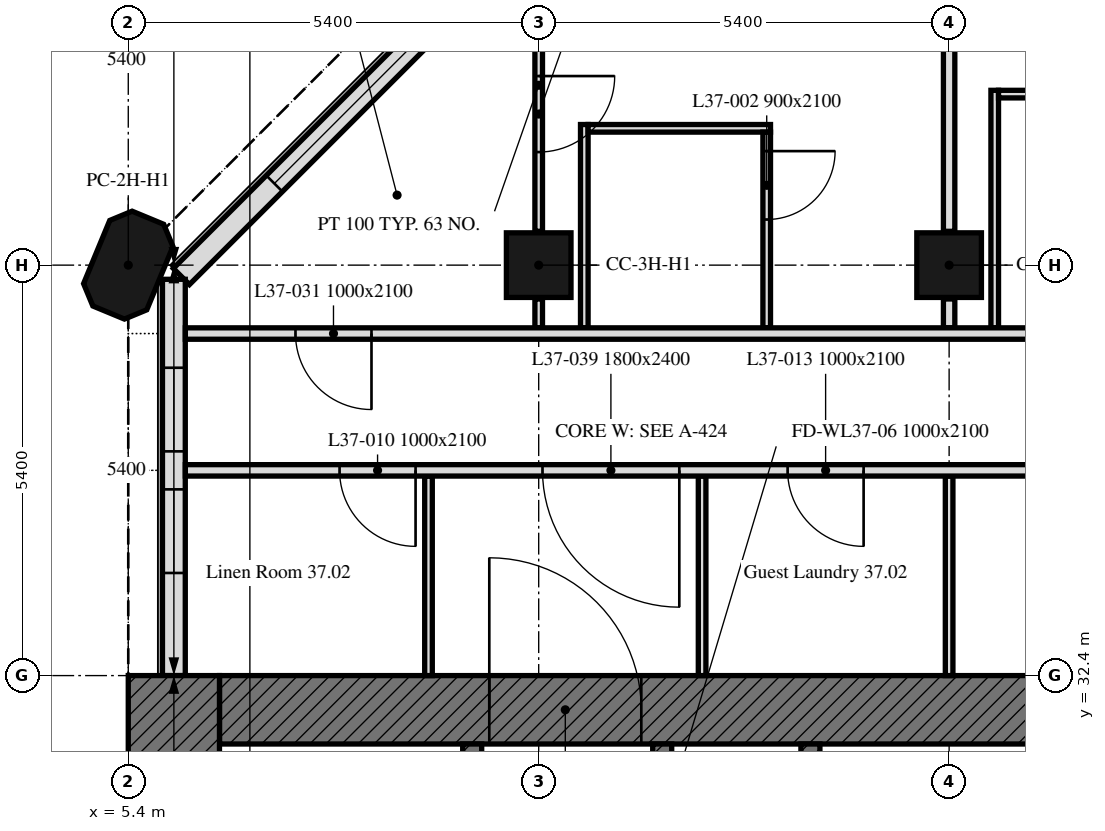
"""IFC4 building model, lengths in metres.
Left out: names, types, materials, properties, quantities, classifications, styles, units other than length and angle.
Written with IfcOpenShell. Run it as: python <this file> out.ifc"""

import sys

from ifc_helpers import new_model, si_unit, direction, frame, frame_2d, origin, origin_2d, place, context, subcontext, project, spatial, polyline, rectangle, outline, extrude, element, fill, save


model = new_model("IFC4")
c1 = context("Model", 3, precision=1e-05, world=origin(), true_north=direction((0.0, 1.0)))
c2 = subcontext(c1, "Body", "Model", "MODEL_VIEW")
j1 = project(units=[si_unit("LENGTHUNIT", "METRE"), si_unit("PLANEANGLEUNIT", "RADIAN")], contexts=[c1])
p1 = place(None, origin())
s1 = spatial("IfcSite", under=j1, at=p1, CompositionType="ELEMENT")
p2 = place(p1, origin())
s2 = spatial("IfcBuilding", under=s1, at=p2, CompositionType="ELEMENT")
p3 = place(p2, frame((0.0, 0.0, 159.4)))
s3 = spatial("IfcBuildingStorey", under=s2, at=p3, CompositionType="ELEMENT", Elevation=159.4)
p4 = place(p3, frame((5.4, 37.8, 0.0), z_axis=(0.0, 0.0, 1.0), x_axis=(0.382683432365, 0.923879532511, 0.0)))
e1 = element("IfcColumn", 1, at=p4, inside=s3, PredefinedType="COLUMN", context=c2, shape_type="SweptSolid", body=[
    extrude(outline(polyline([(-0.45, -0.45), (0.45, -0.45), (0.675, -0.225), (0.675, 0.225), (0.45, 0.45), (-0.45, 0.45), (-0.675, 0.225), (-0.675, -0.225), (-0.45, -0.45)])), origin(), (0.0, 0.0, 1.0), 3.0),
])
for number, where, z_axis, x_axis in (
    (2, (10.8, 37.8, 0.0), (0.0, 0.0, 1.0), (1.0, 0.0, 0.0)),
    (3, (16.2, 37.8, 0.0), (0.0, 0.0, 1.0), (1.0, 0.0, 0.0)),
):
    element("IfcColumn", number, at=place(p3, frame(where, z_axis=z_axis, x_axis=x_axis)), inside=s3, PredefinedType="COLUMN", context=c2, shape_type="SweptSolid", body=[
        extrude(rectangle(XDim=0.85, YDim=0.85, at=origin_2d()), origin(), (0.0, 0.0, 1.0), 3.0),
    ])
p5 = place(p3, frame((10.949, 42.501, 0.0), z_axis=(0.0, 0.0, 1.0), x_axis=(-0.707106781187, -0.707106781187, 0.0)))
e4 = element("IfcWall", 4, at=p5, inside=s3, PredefinedType="SOLIDWALL", context=c2, shape_type="SweptSolid", body=[
    extrude(rectangle(XDim=6.86, YDim=0.3, at=frame_2d((3.43, 0.0))), origin(), (0.0, 0.0, 1.0), 3.0),
])
p6 = place(p5, frame((1.73, 0.0, 0.9)))
e5 = element("IfcOpeningElement", 5, at=p6, cuts=e4, PredefinedType="OPENING", context=c2, shape_type="SweptSolid", body=[
    extrude(rectangle(XDim=3.4, YDim=1.7, at=frame_2d((1.7, 0.85))), frame((0.0, 0.16, 0.0), z_axis=(0.0, -1.0, 0.0), x_axis=(1.0, 0.0, 0.0)), (0.0, 0.0, 1.0), 0.32),
])
p7 = place(p3, frame((6.0, 37.614, 0.0), z_axis=(0.0, 0.0, 1.0), x_axis=(0.0, -1.0, 0.0)))
e6 = element("IfcWall", 6, at=p7, inside=s3, PredefinedType="SOLIDWALL", context=c2, shape_type="SweptSolid", body=[
    extrude(rectangle(XDim=5.214, YDim=0.3, at=frame_2d((2.607, 0.0))), origin(), (0.0, 0.0, 1.0), 3.0),
])
p8 = place(p7, frame((1.164, 0.0, 0.9)))
e7 = element("IfcOpeningElement", 7, at=p8, cuts=e6, PredefinedType="OPENING", context=c2, shape_type="SweptSolid", body=[
    extrude(rectangle(XDim=1.1, YDim=1.7, at=frame_2d((0.55, 0.85))), frame((0.0, 0.16, 0.0), z_axis=(0.0, -1.0, 0.0), x_axis=(1.0, 0.0, 0.0)), (0.0, 0.0, 1.0), 0.32),
])
p9 = place(p7, frame((2.764, 0.0, 0.9)))
e8 = element("IfcOpeningElement", 8, at=p9, cuts=e6, PredefinedType="OPENING", context=c2, shape_type="SweptSolid", body=[
    extrude(rectangle(XDim=1.1, YDim=1.7, at=frame_2d((0.55, 0.85))), frame((0.0, 0.16, 0.0), z_axis=(0.0, -1.0, 0.0), x_axis=(1.0, 0.0, 0.0)), (0.0, 0.0, 1.0), 0.32),
])
p10 = place(p3, frame((6.6, 31.95, 0.0), z_axis=(0.0, 0.0, 1.0), x_axis=(1.0, 0.0, 0.0)))
e9 = element("IfcWall", 9, at=p10, inside=s3, PredefinedType="SOLIDWALL", context=c2, shape_type="SweptSolid", body=[
    extrude(rectangle(XDim=11.1, YDim=0.9, at=frame_2d((5.55, 0.0))), origin(), (0.0, 0.0, 1.0), 3.0),
])
p11 = place(p10, frame((3.55, 0.0, 0.0)))
e10 = element("IfcOpeningElement", 10, at=p11, cuts=e9, PredefinedType="OPENING", context=c2, shape_type="SweptSolid", body=[
    extrude(rectangle(XDim=2.0, YDim=2.4, at=frame_2d((1.0, 1.2))), frame((0.0, 0.45, 0.0), z_axis=(0.0, -1.0, 0.0), x_axis=(1.0, 0.0, 0.0)), (0.0, 0.0, 1.0), 0.9),
])
p12 = place(p3, frame((6.0, 16.2, 0.0), z_axis=(0.0, 0.0, 1.0), x_axis=(0.0, 1.0, 0.0)))
e11 = element("IfcWall", 11, at=p12, inside=s3, PredefinedType="SOLIDWALL", context=c2, shape_type="SweptSolid", body=[
    extrude(rectangle(XDim=16.2, YDim=1.2, at=frame_2d((8.1, 0.0))), origin(), (0.0, 0.0, 1.0), 3.0),
])
p13 = place(p3, frame((9.925, 17.1, 0.0), z_axis=(0.0, 0.0, 1.0), x_axis=(0.0, 1.0, 0.0)))
e12 = element("IfcWall", 12, at=p13, inside=s3, PredefinedType="SOLIDWALL", context=c2, shape_type="SweptSolid", body=[
    extrude(rectangle(XDim=14.4, YDim=0.25, at=frame_2d((7.2, 0.0))), origin(), (0.0, 0.0, 1.0), 3.0),
])
p14 = place(p13, frame((4.6, 0.0, 0.0)))
e13 = element("IfcOpeningElement", 13, at=p14, cuts=e12, PredefinedType="OPENING", context=c2, shape_type="SweptSolid", body=[
    extrude(rectangle(XDim=1.0, YDim=2.1, at=frame_2d((0.5, 1.05))), frame((0.0, 0.125, 0.0), z_axis=(0.0, -1.0, 0.0), x_axis=(1.0, 0.0, 0.0)), (0.0, 0.0, 1.0), 0.25),
])
p15 = place(p13, frame((7.062, 0.0, 0.0)))
e14 = element("IfcOpeningElement", 14, at=p15, cuts=e12, PredefinedType="OPENING", context=c2, shape_type="SweptSolid", body=[
    extrude(rectangle(XDim=1.2, YDim=2.1, at=frame_2d((0.6, 1.05))), frame((0.0, 0.125, 0.0), z_axis=(0.0, -1.0, 0.0), x_axis=(1.0, 0.0, 0.0)), (0.0, 0.0, 1.0), 0.25),
])
p16 = place(p13, frame((9.472, 0.0, 0.0)))
e15 = element("IfcOpeningElement", 15, at=p16, cuts=e12, PredefinedType="OPENING", context=c2, shape_type="SweptSolid", body=[
    extrude(rectangle(XDim=0.9, YDim=2.1, at=frame_2d((0.45, 1.05))), frame((0.0, 0.125, 0.0), z_axis=(0.0, -1.0, 0.0), x_axis=(1.0, 0.0, 0.0)), (0.0, 0.0, 1.0), 0.25),
])
p17 = place(p13, frame((11.159, 0.0, 0.0)))
e16 = element("IfcOpeningElement", 16, at=p17, cuts=e12, PredefinedType="OPENING", context=c2, shape_type="SweptSolid", body=[
    extrude(rectangle(XDim=0.9, YDim=2.1, at=frame_2d((0.45, 1.05))), frame((0.0, 0.125, 0.0), z_axis=(0.0, -1.0, 0.0), x_axis=(1.0, 0.0, 0.0)), (0.0, 0.0, 1.0), 0.25),
])
p18 = place(p13, frame((13.1, 0.0, 0.0)))
e17 = element("IfcOpeningElement", 17, at=p18, cuts=e12, PredefinedType="OPENING", context=c2, shape_type="SweptSolid", body=[
    extrude(rectangle(XDim=0.9, YDim=2.1, at=frame_2d((0.45, 1.05))), frame((0.0, 0.125, 0.0), z_axis=(0.0, -1.0, 0.0), x_axis=(1.0, 0.0, 0.0)), (0.0, 0.0, 1.0), 0.25),
])
p19 = place(p3, frame((14.375, 17.1, 0.0), z_axis=(0.0, 0.0, 1.0), x_axis=(0.0, 1.0, 0.0)))
e18 = element("IfcWall", 18, at=p19, inside=s3, PredefinedType="SOLIDWALL", context=c2, shape_type="SweptSolid", body=[
    extrude(rectangle(XDim=14.4, YDim=0.25, at=frame_2d((7.2, 0.0))), origin(), (0.0, 0.0, 1.0), 3.0),
])
p20 = place(p19, frame((13.15, 0.0, 0.0)))
e19 = element("IfcOpeningElement", 19, at=p20, cuts=e18, PredefinedType="OPENING", context=c2, shape_type="SweptSolid", body=[
    extrude(rectangle(XDim=1.0, YDim=2.1, at=frame_2d((0.5, 1.05))), frame((0.0, 0.125, 0.0), z_axis=(0.0, -1.0, 0.0), x_axis=(1.0, 0.0, 0.0)), (0.0, 0.0, 1.0), 0.25),
])
p21 = place(p19, frame((0.6, 0.0, 0.0)))
e20 = element("IfcOpeningElement", 20, at=p21, cuts=e18, PredefinedType="OPENING", context=c2, shape_type="SweptSolid", body=[
    extrude(rectangle(XDim=1.1, YDim=2.1, at=frame_2d((0.55, 1.05))), frame((0.0, 0.125, 0.0), z_axis=(0.0, -1.0, 0.0), x_axis=(1.0, 0.0, 0.0)), (0.0, 0.0, 1.0), 0.25),
])
p22 = place(p19, frame((3.25, 0.0, 0.0)))
e21 = element("IfcOpeningElement", 21, at=p22, cuts=e18, PredefinedType="OPENING", context=c2, shape_type="SweptSolid", body=[
    extrude(rectangle(XDim=0.9, YDim=2.1, at=frame_2d((0.45, 1.05))), frame((0.0, 0.125, 0.0), z_axis=(0.0, -1.0, 0.0), x_axis=(1.0, 0.0, 0.0)), (0.0, 0.0, 1.0), 0.25),
])
p23 = place(p3, frame((12.425, 29.4, 0.0), z_axis=(0.0, 0.0, 1.0), x_axis=(0.0, 1.0, 0.0)))
e22 = element("IfcWall", 22, at=p23, inside=s3, PredefinedType="SOLIDWALL", context=c2, shape_type="SweptSolid", body=[
    extrude(rectangle(XDim=2.1, YDim=0.25, at=frame_2d((1.05, 0.0))), origin(), (0.0, 0.0, 1.0), 3.0),
])
p24 = place(p23, frame((0.5, 0.0, 0.0)))
e23 = element("IfcOpeningElement", 23, at=p24, cuts=e22, PredefinedType="OPENING", context=c2, shape_type="SweptSolid", body=[
    extrude(rectangle(XDim=1.0, YDim=2.1, at=frame_2d((0.5, 1.05))), frame((0.0, 0.125, 0.0), z_axis=(0.0, -1.0, 0.0), x_axis=(1.0, 0.0, 0.0)), (0.0, 0.0, 1.0), 0.25),
])
p25 = place(p3, frame((10.8, 42.088, 0.0), z_axis=(0.0, 0.0, 1.0), x_axis=(0.0, -1.0, 0.0)))
e24 = element("IfcWall", 24, at=p25, inside=s3, PredefinedType="PARTITIONING", context=c2, shape_type="SweptSolid", body=[
    extrude(rectangle(XDim=3.843, YDim=0.1, at=frame_2d((1.921, 0.0))), origin(), (0.0, 0.0, 1.0), 3.0),
])
p26 = place(p25, frame((1.8, 0.0, 0.0)))
e25 = element("IfcOpeningElement", 25, at=p26, cuts=e24, PredefinedType="OPENING", context=c2, shape_type="SweptSolid", body=[
    extrude(rectangle(XDim=1.0, YDim=2.1, at=frame_2d((0.5, 1.05))), frame((0.0, 0.05, 0.0), z_axis=(0.0, -1.0, 0.0), x_axis=(1.0, 0.0, 0.0)), (0.0, 0.0, 1.0), 0.1),
])
p27 = place(p3, frame((10.8, 37.355, 0.0), z_axis=(0.0, 0.0, 1.0), x_axis=(0.0, -1.0, 0.0)))
e26 = element("IfcWall", 26, at=p27, inside=s3, PredefinedType="PARTITIONING", context=c2, shape_type="SweptSolid", body=[
    extrude(rectangle(XDim=0.38, YDim=0.1, at=frame_2d((0.19, 0.0))), origin(), (0.0, 0.0, 1.0), 3.0),
])
p28 = place(p3, frame((11.4, 36.975, 0.0), z_axis=(0.0, 0.0, 1.0), x_axis=(0.0, 1.0, 0.0)))
e27 = element("IfcWall", 27, at=p28, inside=s3, PredefinedType="PARTITIONING", context=c2, shape_type="SweptSolid", body=[
    extrude(rectangle(XDim=2.675, YDim=0.1, at=frame_2d((1.337, 0.0))), origin(), (0.0, 0.0, 1.0), 3.0),
])
p29 = place(p3, frame((11.45, 39.6, 0.0), z_axis=(0.0, 0.0, 1.0), x_axis=(1.0, 0.0, 0.0)))
e28 = element("IfcWall", 28, at=p29, inside=s3, PredefinedType="PARTITIONING", context=c2, shape_type="SweptSolid", body=[
    extrude(rectangle(XDim=2.4, YDim=0.1, at=frame_2d((1.2, 0.0))), origin(), (0.0, 0.0, 1.0), 3.0),
])
p30 = place(p3, frame((13.8, 39.55, 0.0), z_axis=(0.0, 0.0, 1.0), x_axis=(0.0, -1.0, 0.0)))
e29 = element("IfcWall", 29, at=p30, inside=s3, PredefinedType="PARTITIONING", context=c2, shape_type="SweptSolid", body=[
    extrude(rectangle(XDim=2.575, YDim=0.1, at=frame_2d((1.288, 0.0))), origin(), (0.0, 0.0, 1.0), 3.0),
])
p31 = place(p30, frame((0.25, 0.0, 0.0)))
e30 = element("IfcOpeningElement", 30, at=p31, cuts=e29, PredefinedType="OPENING", context=c2, shape_type="SweptSolid", body=[
    extrude(rectangle(XDim=0.9, YDim=2.1, at=frame_2d((0.45, 1.05))), frame((0.0, 0.05, 0.0), z_axis=(0.0, -1.0, 0.0), x_axis=(1.0, 0.0, 0.0)), (0.0, 0.0, 1.0), 0.1),
])
p32 = place(p3, frame((16.2, 36.975, 0.0), z_axis=(0.0, 0.0, 1.0), x_axis=(0.0, 1.0, 0.0)))
e31 = element("IfcWall", 31, at=p32, inside=s3, PredefinedType="PARTITIONING", context=c2, shape_type="SweptSolid", body=[
    extrude(rectangle(XDim=0.38, YDim=0.15, at=frame_2d((0.19, 0.0))), origin(), (0.0, 0.0, 1.0), 3.0),
])
p33 = place(p3, frame((16.2, 38.245, 0.0), z_axis=(0.0, 0.0, 1.0), x_axis=(0.0, 1.0, 0.0)))
e32 = element("IfcWall", 32, at=p33, inside=s3, PredefinedType="PARTITIONING", context=c2, shape_type="SweptSolid", body=[
    extrude(rectangle(XDim=4.204, YDim=0.15, at=frame_2d((2.102, 0.0))), origin(), (0.0, 0.0, 1.0), 3.0),
])
p34 = place(p3, frame((16.8, 36.975, 0.0), z_axis=(0.0, 0.0, 1.0), x_axis=(0.0, 1.0, 0.0)))
e33 = element("IfcWall", 33, at=p34, inside=s3, PredefinedType="PARTITIONING", context=c2, shape_type="SweptSolid", body=[
    extrude(rectangle(XDim=3.125, YDim=0.1, at=frame_2d((1.562, 0.0))), origin(), (0.0, 0.0, 1.0), 3.0),
])
p35 = place(p3, frame((16.85, 40.05, 0.0), z_axis=(0.0, 0.0, 1.0), x_axis=(1.0, 0.0, 0.0)))
e34 = element("IfcWall", 34, at=p35, inside=s3, PredefinedType="PARTITIONING", context=c2, shape_type="SweptSolid", body=[
    extrude(rectangle(XDim=2.1, YDim=0.1, at=frame_2d((1.05, 0.0))), origin(), (0.0, 0.0, 1.0), 3.0),
])
p36 = place(p3, frame((47.849, 36.9, 0.0), z_axis=(0.0, 0.0, 1.0), x_axis=(-1.0, 0.0, 0.0)))
e35 = element("IfcWall", 35, at=p36, inside=s3, PredefinedType="PARTITIONING", context=c2, shape_type="SweptSolid", body=[
    extrude(rectangle(XDim=41.698, YDim=0.15, at=frame_2d((20.849, 0.0))), origin(), (0.0, 0.0, 1.0), 3.0),
])
p37 = place(p36, frame((39.249, 0.0, 0.0)))
e36 = element("IfcOpeningElement", 36, at=p37, cuts=e35, PredefinedType="OPENING", context=c2, shape_type="SweptSolid", body=[
    extrude(rectangle(XDim=1.0, YDim=2.1, at=frame_2d((0.5, 1.05))), frame((0.0, 0.075, 0.0), z_axis=(0.0, -1.0, 0.0), x_axis=(1.0, 0.0, 0.0)), (0.0, 0.0, 1.0), 0.15),
])
p38 = place(p36, frame((27.649, 0.0, 0.0)))
e37 = element("IfcOpeningElement", 37, at=p38, cuts=e35, PredefinedType="OPENING", context=c2, shape_type="SweptSolid", body=[
    extrude(rectangle(XDim=1.0, YDim=2.1, at=frame_2d((0.5, 1.05))), frame((0.0, 0.075, 0.0), z_axis=(0.0, -1.0, 0.0), x_axis=(1.0, 0.0, 0.0)), (0.0, 0.0, 1.0), 0.15),
])
p39 = place(p36, frame((22.249, 0.0, 0.0)))
e38 = element("IfcOpeningElement", 38, at=p39, cuts=e35, PredefinedType="OPENING", context=c2, shape_type="SweptSolid", body=[
    extrude(rectangle(XDim=1.0, YDim=2.1, at=frame_2d((0.5, 1.05))), frame((0.0, 0.075, 0.0), z_axis=(0.0, -1.0, 0.0), x_axis=(1.0, 0.0, 0.0)), (0.0, 0.0, 1.0), 0.15),
])
p40 = place(p36, frame((16.849, 0.0, 0.0)))
e39 = element("IfcOpeningElement", 39, at=p40, cuts=e35, PredefinedType="OPENING", context=c2, shape_type="SweptSolid", body=[
    extrude(rectangle(XDim=1.0, YDim=2.1, at=frame_2d((0.5, 1.05))), frame((0.0, 0.075, 0.0), z_axis=(0.0, -1.0, 0.0), x_axis=(1.0, 0.0, 0.0)), (0.0, 0.0, 1.0), 0.15),
])
p41 = place(p36, frame((11.449, 0.0, 0.0)))
e40 = element("IfcOpeningElement", 40, at=p41, cuts=e35, PredefinedType="OPENING", context=c2, shape_type="SweptSolid", body=[
    extrude(rectangle(XDim=1.0, YDim=2.1, at=frame_2d((0.5, 1.05))), frame((0.0, 0.075, 0.0), z_axis=(0.0, -1.0, 0.0), x_axis=(1.0, 0.0, 0.0)), (0.0, 0.0, 1.0), 0.15),
])
p42 = place(p36, frame((2.744, 0.0, 0.0)))
e41 = element("IfcOpeningElement", 41, at=p42, cuts=e35, PredefinedType="OPENING", context=c2, shape_type="SweptSolid", body=[
    extrude(rectangle(XDim=1.0, YDim=2.1, at=frame_2d((0.5, 1.05))), frame((0.0, 0.075, 0.0), z_axis=(0.0, -1.0, 0.0), x_axis=(1.0, 0.0, 0.0)), (0.0, 0.0, 1.0), 0.15),
])
for number, where, z_axis, x_axis in (
    (42, (16.2, 35.025, 0.0), (0.0, 0.0, 1.0), (0.0, -1.0, 0.0)),
    (43, (9.35, 35.025, 0.0), (0.0, 0.0, 1.0), (0.0, -1.0, 0.0)),
    (44, (12.95, 32.4, 0.0), (0.0, 0.0, 1.0), (0.0, 1.0, 0.0)),
):
    element("IfcWall", number, at=place(p3, frame(where, z_axis=z_axis, x_axis=x_axis)), inside=s3, PredefinedType="PARTITIONING", context=c2, shape_type="SweptSolid", body=[
        extrude(rectangle(XDim=2.625, YDim=0.1, at=frame_2d((1.312, 0.0))), origin(), (0.0, 0.0, 1.0), 3.0),
    ])
p43 = place(p3, frame((43.275, 35.1, 0.0), z_axis=(0.0, 0.0, 1.0), x_axis=(-1.0, 0.0, 0.0)))
e45 = element("IfcWall", 45, at=p43, inside=s3, PredefinedType="PARTITIONING", context=c2, shape_type="SweptSolid", body=[
    extrude(rectangle(XDim=37.124, YDim=0.15, at=frame_2d((18.562, 0.0))), origin(), (0.0, 0.0, 1.0), 3.0),
])
p44 = place(p43, frame((18.475, 0.0, 0.0)))
e46 = element("IfcOpeningElement", 46, at=p44, cuts=e45, PredefinedType="OPENING", context=c2, shape_type="SweptSolid", body=[
    extrude(rectangle(XDim=1.0, YDim=2.1, at=frame_2d((0.5, 1.05))), frame((0.0, 0.075, 0.0), z_axis=(0.0, -1.0, 0.0), x_axis=(1.0, 0.0, 0.0)), (0.0, 0.0, 1.0), 0.15),
])
p45 = place(p43, frame((34.095, 0.0, 0.0)))
e47 = element("IfcOpeningElement", 47, at=p45, cuts=e45, PredefinedType="OPENING", context=c2, shape_type="SweptSolid", body=[
    extrude(rectangle(XDim=1.0, YDim=2.1, at=frame_2d((0.5, 1.05))), frame((0.0, 0.075, 0.0), z_axis=(0.0, -1.0, 0.0), x_axis=(1.0, 0.0, 0.0)), (0.0, 0.0, 1.0), 0.15),
])
p46 = place(p43, frame((8.75, 0.0, 0.0)))
e48 = element("IfcOpeningElement", 48, at=p46, cuts=e45, PredefinedType="OPENING", context=c2, shape_type="SweptSolid", body=[
    extrude(rectangle(XDim=1.0, YDim=2.1, at=frame_2d((0.5, 1.05))), frame((0.0, 0.075, 0.0), z_axis=(0.0, -1.0, 0.0), x_axis=(1.0, 0.0, 0.0)), (0.0, 0.0, 1.0), 0.15),
])
p47 = place(p43, frame((1.55, 0.0, 0.0)))
e49 = element("IfcOpeningElement", 49, at=p47, cuts=e45, PredefinedType="OPENING", context=c2, shape_type="SweptSolid", body=[
    extrude(rectangle(XDim=1.0, YDim=2.1, at=frame_2d((0.5, 1.05))), frame((0.0, 0.075, 0.0), z_axis=(0.0, -1.0, 0.0), x_axis=(1.0, 0.0, 0.0)), (0.0, 0.0, 1.0), 0.15),
])
p48 = place(p43, frame((28.2, 0.0, 0.0)))
e50 = element("IfcOpeningElement", 50, at=p48, cuts=e45, PredefinedType="OPENING", context=c2, shape_type="SweptSolid", body=[
    extrude(rectangle(XDim=1.0, YDim=2.1, at=frame_2d((0.5, 1.05))), frame((0.0, 0.075, 0.0), z_axis=(0.0, -1.0, 0.0), x_axis=(1.0, 0.0, 0.0)), (0.0, 0.0, 1.0), 0.15),
])
p49 = place(p43, frame((30.625, 0.0, 0.0)))
e51 = element("IfcOpeningElement", 51, at=p49, cuts=e45, PredefinedType="OPENING", context=c2, shape_type="SweptSolid", body=[
    extrude(rectangle(XDim=1.8, YDim=2.4, at=frame_2d((0.9, 1.2))), frame((0.0, 0.075, 0.0), z_axis=(0.0, -1.0, 0.0), x_axis=(1.0, 0.0, 0.0)), (0.0, 0.0, 1.0), 0.15),
])
p50 = place(p43, frame((5.525, 0.0, 0.0)))
e52 = element("IfcOpeningElement", 52, at=p50, cuts=e45, PredefinedType="OPENING", context=c2, shape_type="SweptSolid", body=[
    extrude(rectangle(XDim=1.8, YDim=2.4, at=frame_2d((0.9, 1.2))), frame((0.0, 0.075, 0.0), z_axis=(0.0, -1.0, 0.0), x_axis=(1.0, 0.0, 0.0)), (0.0, 0.0, 1.0), 0.15),
])
p51 = place(p6, origin())
e53 = element("IfcWindow", 53, at=p51, inside=s3, PartitioningType="SINGLE_PANEL", PredefinedType="WINDOW", context=c2, shape_type="SweptSolid", body=[
    extrude(rectangle(XDim=3.4, YDim=1.7, at=frame_2d((1.7, 0.85))), frame((0.0, 0.03, 0.0), z_axis=(0.0, -1.0, 0.0), x_axis=(1.0, 0.0, 0.0)), (0.0, 0.0, 1.0), 0.06),
])
fill(e5, e53)
p52 = place(p8, origin())
e54 = element("IfcWindow", 54, at=p52, inside=s3, PartitioningType="SINGLE_PANEL", PredefinedType="WINDOW", context=c2, shape_type="SweptSolid", body=[
    extrude(rectangle(XDim=1.1, YDim=1.7, at=frame_2d((0.55, 0.85))), frame((0.0, 0.03, 0.0), z_axis=(0.0, -1.0, 0.0), x_axis=(1.0, 0.0, 0.0)), (0.0, 0.0, 1.0), 0.06),
])
fill(e7, e54)
p53 = place(p9, origin())
e55 = element("IfcWindow", 55, at=p53, inside=s3, PartitioningType="SINGLE_PANEL", PredefinedType="WINDOW", context=c2, shape_type="SweptSolid", body=[
    extrude(rectangle(XDim=1.1, YDim=1.7, at=frame_2d((0.55, 0.85))), frame((0.0, 0.03, 0.0), z_axis=(0.0, -1.0, 0.0), x_axis=(1.0, 0.0, 0.0)), (0.0, 0.0, 1.0), 0.06),
])
fill(e8, e55)
p54 = place(p11, origin())
e56 = element("IfcDoor", 56, at=p54, inside=s3, OperationType="DOUBLE_DOOR_SINGLE_SWING", PredefinedType="DOOR", context=c2, shape_type="SweptSolid", body=[
    extrude(rectangle(XDim=2.0, YDim=2.4, at=frame_2d((1.0, 1.2))), frame((0.0, 0.025, 0.0), z_axis=(0.0, -1.0, 0.0), x_axis=(1.0, 0.0, 0.0)), (0.0, 0.0, 1.0), 0.05),
])
fill(e10, e56)
p55 = place(p31, origin())
e57 = element("IfcDoor", 57, at=p55, inside=s3, OperationType="SINGLE_SWING_LEFT", PredefinedType="DOOR", context=c2, shape_type="SweptSolid", body=[
    extrude(rectangle(XDim=0.9, YDim=2.1, at=frame_2d((0.45, 1.05))), frame((0.0, 0.025, 0.0), z_axis=(0.0, -1.0, 0.0), x_axis=(1.0, 0.0, 0.0)), (0.0, 0.0, 1.0), 0.05),
])
fill(e30, e57)
p56 = place(p45, origin())
e58 = element("IfcDoor", 58, at=p56, inside=s3, OperationType="SINGLE_SWING_LEFT", PredefinedType="DOOR", context=c2, shape_type="SweptSolid", body=[
    extrude(rectangle(XDim=1.0, YDim=2.1, at=frame_2d((0.5, 1.05))), frame((0.0, 0.025, 0.0), z_axis=(0.0, -1.0, 0.0), x_axis=(1.0, 0.0, 0.0)), (0.0, 0.0, 1.0), 0.05),
])
fill(e47, e58)
p57 = place(p48, origin())
e59 = element("IfcDoor", 59, at=p57, inside=s3, OperationType="SINGLE_SWING_RIGHT", PredefinedType="DOOR", context=c2, shape_type="SweptSolid", body=[
    extrude(rectangle(XDim=1.0, YDim=2.1, at=frame_2d((0.5, 1.05))), frame((0.0, 0.025, 0.0), z_axis=(0.0, -1.0, 0.0), x_axis=(1.0, 0.0, 0.0)), (0.0, 0.0, 1.0), 0.05),
])
fill(e50, e59)
p58 = place(p26, origin())
e60 = element("IfcDoor", 60, at=p58, inside=s3, OperationType="SINGLE_SWING_LEFT", PredefinedType="DOOR", context=c2, shape_type="SweptSolid", body=[
    extrude(rectangle(XDim=1.0, YDim=2.1, at=frame_2d((0.5, 1.05))), frame((0.0, 0.025, 0.0), z_axis=(0.0, -1.0, 0.0), x_axis=(1.0, 0.0, 0.0)), (0.0, 0.0, 1.0), 0.05),
])
fill(e25, e60)
p59 = place(p37, origin())
e61 = element("IfcDoor", 61, at=p59, inside=s3, OperationType="SINGLE_SWING_RIGHT", PredefinedType="DOOR", context=c2, shape_type="SweptSolid", body=[
    extrude(rectangle(XDim=1.0, YDim=2.1, at=frame_2d((0.5, 1.05))), frame((0.0, 0.025, 0.0), z_axis=(0.0, -1.0, 0.0), x_axis=(1.0, 0.0, 0.0)), (0.0, 0.0, 1.0), 0.05),
])
fill(e36, e61)
p60 = place(p49, origin())
e62 = element("IfcDoor", 62, at=p60, inside=s3, OperationType="DOUBLE_DOOR_SINGLE_SWING", PredefinedType="DOOR", context=c2, shape_type="SweptSolid", body=[
    extrude(rectangle(XDim=1.8, YDim=2.4, at=frame_2d((0.9, 1.2))), frame((0.0, 0.025, 0.0), z_axis=(0.0, -1.0, 0.0), x_axis=(1.0, 0.0, 0.0)), (0.0, 0.0, 1.0), 0.05),
])
fill(e51, e62)
save(model, sys.argv[1])
